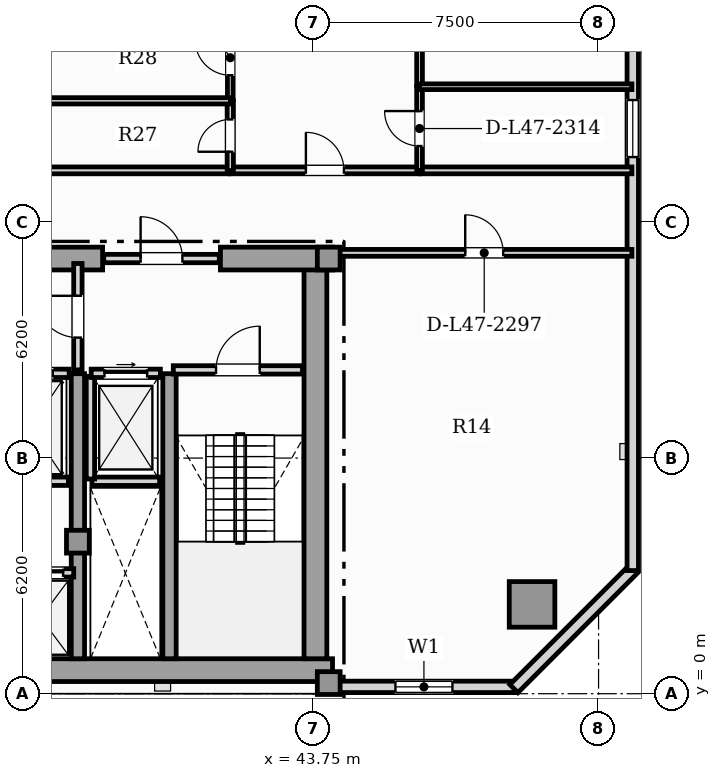
"""IFC4 building model, lengths in metres.
Left out: names, types, materials, properties, quantities, classifications, styles, units other than length and angle.
Written with IfcOpenShell. Run it as: python <this file> out.ifc"""

import sys

from ifc_helpers import new_model, si_unit, direction, frame, frame_2d, origin, origin_2d, place, context, subcontext, project, spatial, rectangle, hollow_rectangle, extrude, element, fill, save


model = new_model("IFC4")
c1 = context("Model", 3, precision=1e-05, world=origin(), true_north=direction((0.0, 1.0)))
c2 = subcontext(c1, "Body", "Model", "MODEL_VIEW")
j1 = project(units=[si_unit("LENGTHUNIT", "METRE"), si_unit("PLANEANGLEUNIT", "RADIAN")], contexts=[c1])
p1 = place(None, origin())
s1 = spatial("IfcSite", under=j1, at=p1, CompositionType="ELEMENT")
p2 = place(p1, origin())
s2 = spatial("IfcBuilding", under=s1, at=p2, CompositionType="ELEMENT")
p3 = place(p2, frame((0.0, 0.0, 192.6)))
s3 = spatial("IfcBuildingStorey", under=s2, at=p3, CompositionType="ELEMENT", Elevation=192.6)
p4 = place(p3, frame((13.25, 0.62, 0.0), z_axis=(0.0, 0.0, 1.0), x_axis=(1.0, 0.0, 0.0)))
e1 = element("IfcWall", 1, at=p4, inside=s3, PredefinedType="SHEAR", context=c2, shape_type="SweptSolid", body=[
    extrude(rectangle(XDim=31.0, YDim=0.6, at=frame_2d((15.5, 0.0))), origin(), (0.0, 0.0, 1.0), 3.63),
])
p5 = place(p3, frame((43.8, 0.92, 0.0), z_axis=(0.0, 0.0, 1.0), x_axis=(0.0, 1.0, 0.0)))
e2 = element("IfcWall", 2, at=p5, inside=s3, PredefinedType="SHEAR", context=c2, shape_type="SweptSolid", body=[
    extrude(rectangle(XDim=10.53, YDim=0.6, at=frame_2d((5.265, 0.0))), origin(), (0.0, 0.0, 1.0), 3.63),
])
p6 = place(p3, frame((30.9, 11.45, 0.0), z_axis=(0.0, 0.0, 1.0), x_axis=(1.0, 0.0, 0.0)))
e3 = element("IfcWall", 3, at=p6, inside=s3, PredefinedType="SHEAR", context=c2, shape_type="SweptSolid", body=[
    extrude(rectangle(XDim=7.3, YDim=0.6, at=frame_2d((3.65, 0.0))), origin(), (0.0, 0.0, 1.0), 3.63),
])
p7 = place(p3, frame((41.3, 11.45, 0.0), z_axis=(0.0, 0.0, 1.0), x_axis=(1.0, 0.0, 0.0)))
e4 = element("IfcWall", 4, at=p7, inside=s3, PredefinedType="SHEAR", context=c2, shape_type="SweptSolid", body=[
    extrude(rectangle(XDim=2.95, YDim=0.6, at=frame_2d((1.475, 0.0))), origin(), (0.0, 0.0, 1.0), 3.63),
])
for number, where, z_axis, x_axis in (
    (5, (37.55, 0.92, 0.0), (0.0, 0.0, 1.0), (0.0, 1.0, 0.0)),
    (6, (39.96, 0.92, 0.0), (0.0, 0.0, 1.0), (0.0, 1.0, 0.0)),
):
    element("IfcWall", number, at=place(p3, frame(where, z_axis=z_axis, x_axis=x_axis)), inside=s3, PredefinedType="SHEAR", context=c2, shape_type="SweptSolid", body=[
        extrude(rectangle(XDim=7.5, YDim=0.35, at=frame_2d((3.75, 0.0))), origin(), (0.0, 0.0, 1.0), 3.63),
    ])
for number, where, z_axis, x_axis in (
    (7, (44.15, 0.28, 0.0), (0.0, 0.0, 1.0), (1.0, 0.0, 0.0)),
    (8, (44.15, 11.45, 0.0), (0.0, 0.0, 1.0), (1.0, 0.0, 0.0)),
    (9, (37.55, 4.0, 0.0), (0.0, 0.0, 1.0), (1.0, 0.0, 0.0)),
):
    element("IfcColumn", number, at=place(p3, frame(where, z_axis=z_axis, x_axis=x_axis)), inside=s3, PredefinedType="COLUMN", context=c2, shape_type="SweptSolid", body=[
        extrude(rectangle(XDim=0.6, YDim=0.6, at=origin_2d()), origin(), (0.0, 0.0, 1.0), 3.85),
    ])
p8 = place(p3, frame((49.5, 2.35, 0.0), z_axis=(0.0, 0.0, 1.0), x_axis=(1.0, 0.0, 0.0)))
e10 = element("IfcColumn", 10, at=p8, inside=s3, PredefinedType="USERDEFINED", context=c2, shape_type="SweptSolid", body=[
    extrude(hollow_rectangle(XDim=1.2, YDim=1.2, WallThickness=0.07, at=origin_2d()), origin(), (0.0, 0.0, 1.0), 3.85),
])
p9 = place(p3, frame((44.25, 0.18, 0.0), z_axis=(0.0, 0.0, 1.0), x_axis=(1.0, 0.0, 0.0)))
e11 = element("IfcWall", 11, at=p9, inside=s3, PredefinedType="SOLIDWALL", context=c2, shape_type="SweptSolid", body=[
    extrude(rectangle(XDim=4.81, YDim=0.3, at=frame_2d((2.405, 0.0))), origin(), (0.0, 0.0, 1.0), 3.63),
])
p10 = place(p9, frame((1.655, 0.0, 0.9)))
e12 = element("IfcOpeningElement", 12, at=p10, cuts=e11, PredefinedType="OPENING", context=c2, shape_type="SweptSolid", body=[
    extrude(rectangle(XDim=1.5, YDim=1.95, at=frame_2d((0.75, 0.975))), frame((0.0, 0.16, 0.0), z_axis=(0.0, -1.0, 0.0), x_axis=(1.0, 0.0, 0.0)), (0.0, 0.0, 1.0), 0.32),
])
p11 = place(p3, frame((49.022, 0.135, 0.0), z_axis=(0.0, 0.0, 1.0), x_axis=(0.707106781187, 0.707106781187, 0.0)))
e13 = element("IfcWall", 13, at=p11, inside=s3, PredefinedType="SOLIDWALL", context=c2, shape_type="SweptSolid", body=[
    extrude(rectangle(XDim=4.445, YDim=0.3, at=frame_2d((2.223, 0.0))), origin(), (0.0, 0.0, 1.0), 3.63),
])
p12 = place(p3, frame((52.15, 3.24, 0.0), z_axis=(0.0, 0.0, 1.0), x_axis=(0.0, 1.0, 0.0)))
e14 = element("IfcWall", 14, at=p12, inside=s3, PredefinedType="SOLIDWALL", context=c2, shape_type="SweptSolid", body=[
    extrude(rectangle(XDim=33.92, YDim=0.3, at=frame_2d((16.96, 0.0))), origin(), (0.0, 0.0, 1.0), 3.63),
])
p13 = place(p12, frame((30.56, 0.0, 0.95)))
e15 = element("IfcOpeningElement", 15, at=p13, cuts=e14, PredefinedType="OPENING", context=c2, shape_type="SweptSolid", body=[
    extrude(rectangle(XDim=0.9, YDim=1.5, at=frame_2d((0.45, 0.75))), frame((0.0, 0.16, 0.0), z_axis=(0.0, -1.0, 0.0), x_axis=(1.0, 0.0, 0.0)), (0.0, 0.0, 1.0), 0.32),
])
p14 = place(p12, frame((10.88, 0.0, 0.9)))
e16 = element("IfcOpeningElement", 16, at=p14, cuts=e14, PredefinedType="OPENING", context=c2, shape_type="SweptSolid", body=[
    extrude(rectangle(XDim=1.5, YDim=1.95, at=frame_2d((0.75, 0.975))), frame((0.0, 0.16, 0.0), z_axis=(0.0, -1.0, 0.0), x_axis=(1.0, 0.0, 0.0)), (0.0, 0.0, 1.0), 0.32),
])
p15 = place(p12, frame((14.613, 0.0, 0.9)))
e17 = element("IfcOpeningElement", 17, at=p15, cuts=e14, PredefinedType="OPENING", context=c2, shape_type="SweptSolid", body=[
    extrude(rectangle(XDim=1.5, YDim=1.95, at=frame_2d((0.75, 0.975))), frame((0.0, 0.16, 0.0), z_axis=(0.0, -1.0, 0.0), x_axis=(1.0, 0.0, 0.0)), (0.0, 0.0, 1.0), 0.32),
])
p16 = place(p12, frame((19.876, 0.0, 0.9)))
e18 = element("IfcOpeningElement", 18, at=p16, cuts=e14, PredefinedType="OPENING", context=c2, shape_type="SweptSolid", body=[
    extrude(rectangle(XDim=1.5, YDim=1.95, at=frame_2d((0.75, 0.975))), frame((0.0, 0.16, 0.0), z_axis=(0.0, -1.0, 0.0), x_axis=(1.0, 0.0, 0.0)), (0.0, 0.0, 1.0), 0.32),
])
p17 = place(p12, frame((26.009, 0.0, 0.9)))
e19 = element("IfcOpeningElement", 19, at=p17, cuts=e14, PredefinedType="OPENING", context=c2, shape_type="SweptSolid", body=[
    extrude(rectangle(XDim=1.5, YDim=1.95, at=frame_2d((0.75, 0.975))), frame((0.0, 0.16, 0.0), z_axis=(0.0, -1.0, 0.0), x_axis=(1.0, 0.0, 0.0)), (0.0, 0.0, 1.0), 0.32),
])
p18 = place(p12, frame((32.24, 0.0, 0.95)))
e20 = element("IfcOpeningElement", 20, at=p18, cuts=e14, PredefinedType="OPENING", context=c2, shape_type="SweptSolid", body=[
    extrude(rectangle(XDim=0.9, YDim=1.5, at=frame_2d((0.45, 0.75))), frame((0.0, 0.16, 0.0), z_axis=(0.0, -1.0, 0.0), x_axis=(1.0, 0.0, 0.0)), (0.0, 0.0, 1.0), 0.32),
])
p19 = place(p3, frame((37.92, 5.59, 0.0), z_axis=(0.0, 0.0, 1.0), x_axis=(1.0, 0.0, 0.0)))
e21 = element("IfcWall", 21, at=p19, inside=s3, PredefinedType="SOLIDWALL", context=c2, shape_type="SweptSolid", body=[
    extrude(rectangle(XDim=1.78, YDim=0.22, at=frame_2d((0.89, 0.0))), origin(), (0.0, 0.0, 1.0), 3.63),
])
p20 = place(p3, frame((37.88, 5.65, 0.0), z_axis=(0.0, 0.0, 1.0), x_axis=(0.0, 1.0, 0.0)))
e22 = element("IfcWall", 22, at=p20, inside=s3, PredefinedType="SOLIDWALL", context=c2, shape_type="SweptSolid", body=[
    extrude(rectangle(XDim=2.7, YDim=0.22, at=frame_2d((1.35, 0.0))), origin(), (0.0, 0.0, 1.0), 3.63),
])
p21 = place(p3, frame((37.9, 8.43, 0.0), z_axis=(0.0, 0.0, 1.0), x_axis=(1.0, 0.0, 0.0)))
e23 = element("IfcWall", 23, at=p21, inside=s3, PredefinedType="SOLIDWALL", context=c2, shape_type="SweptSolid", body=[
    extrude(rectangle(XDim=1.82, YDim=0.22, at=frame_2d((0.91, 0.0))), origin(), (0.0, 0.0, 1.0), 3.63),
])
p22 = place(p21, frame((0.35, 0.0, 0.0)))
e24 = element("IfcOpeningElement", 24, at=p22, cuts=e23, PredefinedType="OPENING", context=c2, shape_type="SweptSolid", body=[
    extrude(rectangle(XDim=1.12, YDim=2.25, at=frame_2d((0.56, 1.125))), frame((0.0, 0.12, 0.0), z_axis=(0.0, -1.0, 0.0), x_axis=(1.0, 0.0, 0.0)), (0.0, 0.0, 1.0), 0.24),
])
p23 = place(p3, frame((35.3, 5.59, 0.0), z_axis=(0.0, 0.0, 1.0), x_axis=(1.0, 0.0, 0.0)))
e25 = element("IfcWall", 25, at=p23, inside=s3, PredefinedType="SOLIDWALL", context=c2, shape_type="SweptSolid", body=[
    extrude(rectangle(XDim=2.0, YDim=0.22, at=frame_2d((1.0, 0.0))), origin(), (0.0, 0.0, 1.0), 3.63),
])
p24 = place(p3, frame((35.28, 8.43, 0.0), z_axis=(0.0, 0.0, 1.0), x_axis=(1.0, 0.0, 0.0)))
e26 = element("IfcWall", 26, at=p24, inside=s3, PredefinedType="SOLIDWALL", context=c2, shape_type="SweptSolid", body=[
    extrude(rectangle(XDim=2.04, YDim=0.22, at=frame_2d((1.02, 0.0))), origin(), (0.0, 0.0, 1.0), 3.63),
])
p25 = place(p24, frame((0.43, 0.0, 0.0)))
e27 = element("IfcOpeningElement", 27, at=p25, cuts=e26, PredefinedType="OPENING", context=c2, shape_type="SweptSolid", body=[
    extrude(rectangle(XDim=1.18, YDim=2.2, at=frame_2d((0.59, 1.1))), frame((0.0, 0.12, 0.0), z_axis=(0.0, -1.0, 0.0), x_axis=(1.0, 0.0, 0.0)), (0.0, 0.0, 1.0), 0.24),
])
p26 = place(p3, frame((35.7, 3.18, 0.0), z_axis=(0.0, 0.0, 1.0), x_axis=(1.0, 0.0, 0.0)))
e28 = element("IfcWall", 28, at=p26, inside=s3, PredefinedType="SOLIDWALL", context=c2, shape_type="SweptSolid", body=[
    extrude(rectangle(XDim=1.74, YDim=0.22, at=frame_2d((0.87, 0.0))), origin(), (0.0, 0.0, 1.0), 3.63),
])
p27 = place(p26, frame((0.28, 0.0, 0.0)))
e29 = element("IfcOpeningElement", 29, at=p27, cuts=e28, PredefinedType="OPENING", context=c2, shape_type="SweptSolid", body=[
    extrude(rectangle(XDim=1.18, YDim=2.2, at=frame_2d((0.59, 1.1))), frame((0.0, 0.12, 0.0), z_axis=(0.0, -1.0, 0.0), x_axis=(1.0, 0.0, 0.0)), (0.0, 0.0, 1.0), 0.24),
])
p28 = place(p3, frame((40.06, 8.52, 0.0), z_axis=(0.0, 0.0, 1.0), x_axis=(1.0, 0.0, 0.0)))
e30 = element("IfcWall", 30, at=p28, inside=s3, PredefinedType="SOLIDWALL", context=c2, shape_type="SweptSolid", body=[
    extrude(rectangle(XDim=3.4, YDim=0.22, at=frame_2d((1.7, 0.0))), origin(), (0.0, 0.0, 1.0), 3.63),
])
p29 = place(p28, frame((1.125, 0.0, 0.0)))
e31 = element("IfcOpeningElement", 31, at=p29, cuts=e30, PredefinedType="OPENING", context=c2, shape_type="SweptSolid", body=[
    extrude(rectangle(XDim=1.15, YDim=2.2, at=frame_2d((0.575, 1.1))), frame((0.0, 0.12, 0.0), z_axis=(0.0, -1.0, 0.0), x_axis=(1.0, 0.0, 0.0)), (0.0, 0.0, 1.0), 0.24),
])
p30 = place(p3, frame((37.55, 8.52, 0.0), z_axis=(0.0, 0.0, 1.0), x_axis=(0.0, 1.0, 0.0)))
e32 = element("IfcWall", 32, at=p30, inside=s3, PredefinedType="SOLIDWALL", context=c2, shape_type="SweptSolid", body=[
    extrude(rectangle(XDim=2.8, YDim=0.22, at=frame_2d((1.4, 0.0))), origin(), (0.0, 0.0, 1.0), 3.085),
])
p31 = place(p30, frame((0.85, 0.0, 0.0)))
e33 = element("IfcOpeningElement", 33, at=p31, cuts=e32, PredefinedType="OPENING", context=c2, shape_type="SweptSolid", body=[
    extrude(rectangle(XDim=1.1, YDim=2.2, at=frame_2d((0.55, 1.1))), frame((0.0, 0.12, 0.0), z_axis=(0.0, -1.0, 0.0), x_axis=(1.0, 0.0, 0.0)), (0.0, 0.0, 1.0), 0.24),
])
p32 = place(p3, frame((38.23, 11.45, 0.0), z_axis=(0.0, 0.0, 1.0), x_axis=(1.0, 0.0, 0.0)))
e34 = element("IfcWall", 34, at=p32, inside=s3, PredefinedType="SOLIDWALL", context=c2, shape_type="SweptSolid", body=[
    extrude(rectangle(XDim=3.04, YDim=0.22, at=frame_2d((1.52, 0.0))), origin(), (0.0, 0.0, 1.0), 3.63),
])
p33 = place(p32, frame((0.97, 0.0, 0.0)))
e35 = element("IfcOpeningElement", 35, at=p33, cuts=e34, PredefinedType="OPENING", context=c2, shape_type="SweptSolid", body=[
    extrude(rectangle(XDim=1.1, YDim=2.2, at=frame_2d((0.55, 1.1))), frame((0.0, 0.12, 0.0), z_axis=(0.0, -1.0, 0.0), x_axis=(1.0, 0.0, 0.0)), (0.0, 0.0, 1.0), 0.24),
])
p34 = place(p3, frame((44.355, 11.6, 0.0), z_axis=(0.0, 0.0, 1.0), x_axis=(1.0, 0.0, 0.0)))
e36 = element("IfcWall", 36, at=p34, inside=s3, PredefinedType="PARTITIONING", context=c2, shape_type="SweptSolid", body=[
    extrude(rectangle(XDim=7.772, YDim=0.18, at=frame_2d((3.886, 0.0))), origin(), (0.0, 0.0, 1.0), 3.63),
])
p35 = place(p34, frame((3.386, 0.0, 0.0)))
e37 = element("IfcOpeningElement", 37, at=p35, cuts=e36, PredefinedType="OPENING", context=c2, shape_type="SweptSolid", body=[
    extrude(rectangle(XDim=1.0, YDim=2.15, at=frame_2d((0.5, 1.075))), frame((0.0, 0.1, 0.0), z_axis=(0.0, -1.0, 0.0), x_axis=(1.0, 0.0, 0.0)), (0.0, 0.0, 1.0), 0.2),
])
p36 = place(p3, frame((41.555, 13.77, 0.0), z_axis=(0.0, 0.0, 1.0), x_axis=(1.0, 0.0, 0.0)))
e38 = element("IfcWall", 38, at=p36, inside=s3, PredefinedType="PARTITIONING", context=c2, shape_type="SweptSolid", body=[
    extrude(rectangle(XDim=4.99, YDim=0.18, at=frame_2d((2.495, 0.0))), origin(), (0.0, 0.0, 1.0), 3.63),
])
p37 = place(p36, frame((1.995, 0.0, 0.0)))
e39 = element("IfcOpeningElement", 39, at=p37, cuts=e38, PredefinedType="OPENING", context=c2, shape_type="SweptSolid", body=[
    extrude(rectangle(XDim=1.0, YDim=2.15, at=frame_2d((0.5, 1.075))), frame((0.0, 0.1, 0.0), z_axis=(0.0, -1.0, 0.0), x_axis=(1.0, 0.0, 0.0)), (0.0, 0.0, 1.0), 0.2),
])
p38 = place(p3, frame((36.685, 13.77, 0.0), z_axis=(0.0, 0.0, 1.0), x_axis=(1.0, 0.0, 0.0)))
e40 = element("IfcWall", 40, at=p38, inside=s3, PredefinedType="PARTITIONING", context=c2, shape_type="SweptSolid", body=[
    extrude(rectangle(XDim=4.84, YDim=0.18, at=frame_2d((2.42, 0.0))), origin(), (0.0, 0.0, 1.0), 3.63),
])
p39 = place(p3, frame((46.575, 13.77, 0.0), z_axis=(0.0, 0.0, 1.0), x_axis=(1.0, 0.0, 0.0)))
e41 = element("IfcWall", 41, at=p39, inside=s3, PredefinedType="PARTITIONING", context=c2, shape_type="SweptSolid", body=[
    extrude(rectangle(XDim=5.553, YDim=0.18, at=frame_2d((2.776, 0.0))), origin(), (0.0, 0.0, 1.0), 3.63),
])
p40 = place(p3, frame((41.56, 13.765, 0.0), z_axis=(0.0, 0.0, 1.0), x_axis=(0.0, 1.0, 0.0)))
e42 = element("IfcWall", 42, at=p40, inside=s3, PredefinedType="PLUMBINGWALL", context=c2, shape_type="SweptSolid", body=[
    extrude(rectangle(XDim=1.84, YDim=0.165, at=frame_2d((0.92, 0.0))), origin(), (0.0, 0.0, 1.0), 3.63),
])
p41 = place(p40, frame((0.495, 0.0, 0.0)))
e43 = element("IfcOpeningElement", 43, at=p41, cuts=e42, PredefinedType="OPENING", context=c2, shape_type="SweptSolid", body=[
    extrude(rectangle(XDim=0.85, YDim=2.1, at=frame_2d((0.425, 1.05))), frame((0.0, 0.093, 0.0), z_axis=(0.0, -1.0, 0.0), x_axis=(1.0, 0.0, 0.0)), (0.0, 0.0, 1.0), 0.185),
])
p42 = place(p3, frame((41.56, 15.635, 0.0), z_axis=(0.0, 0.0, 1.0), x_axis=(0.0, 1.0, 0.0)))
e44 = element("IfcWall", 44, at=p42, inside=s3, PredefinedType="PARTITIONING", context=c2, shape_type="SweptSolid", body=[
    extrude(rectangle(XDim=2.197, YDim=0.15, at=frame_2d((1.099, 0.0))), origin(), (0.0, 0.0, 1.0), 3.63),
])
p43 = place(p42, frame((0.639, 0.0, 0.0)))
e45 = element("IfcOpeningElement", 45, at=p43, cuts=e44, PredefinedType="OPENING", context=c2, shape_type="SweptSolid", body=[
    extrude(rectangle(XDim=0.92, YDim=2.1, at=frame_2d((0.46, 1.05))), frame((0.0, 0.085, 0.0), z_axis=(0.0, -1.0, 0.0), x_axis=(1.0, 0.0, 0.0)), (0.0, 0.0, 1.0), 0.17),
])
p44 = place(p3, frame((46.54, 13.765, 0.0), z_axis=(0.0, 0.0, 1.0), x_axis=(0.0, 1.0, 0.0)))
e46 = element("IfcWall", 46, at=p44, inside=s3, PredefinedType="PARTITIONING", context=c2, shape_type="SweptSolid", body=[
    extrude(rectangle(XDim=2.211, YDim=0.15, at=frame_2d((1.105, 0.0))), origin(), (0.0, 0.0, 1.0), 3.63),
])
p45 = place(p44, frame((0.646, 0.0, 0.0)))
e47 = element("IfcOpeningElement", 47, at=p45, cuts=e46, PredefinedType="OPENING", context=c2, shape_type="SweptSolid", body=[
    extrude(rectangle(XDim=0.92, YDim=2.1, at=frame_2d((0.46, 1.05))), frame((0.0, 0.085, 0.0), z_axis=(0.0, -1.0, 0.0), x_axis=(1.0, 0.0, 0.0)), (0.0, 0.0, 1.0), 0.17),
])
p46 = place(p3, frame((46.54, 16.006, 0.0), z_axis=(0.0, 0.0, 1.0), x_axis=(0.0, 1.0, 0.0)))
e48 = element("IfcWall", 48, at=p46, inside=s3, PredefinedType="PARTITIONING", context=c2, shape_type="SweptSolid", body=[
    extrude(rectangle(XDim=5.234, YDim=0.15, at=frame_2d((2.617, 0.0))), origin(), (0.0, 0.0, 1.0), 3.63),
])
p47 = place(p46, frame((2.157, 0.0, 0.0)))
e49 = element("IfcOpeningElement", 49, at=p47, cuts=e48, PredefinedType="OPENING", context=c2, shape_type="SweptSolid", body=[
    extrude(rectangle(XDim=0.92, YDim=2.1, at=frame_2d((0.46, 1.05))), frame((0.0, 0.085, 0.0), z_axis=(0.0, -1.0, 0.0), x_axis=(1.0, 0.0, 0.0)), (0.0, 0.0, 1.0), 0.17),
])
p48 = place(p3, frame((36.685, 15.6, 0.0), z_axis=(0.0, 0.0, 1.0), x_axis=(1.0, 0.0, 0.0)))
e50 = element("IfcWall", 50, at=p48, inside=s3, PredefinedType="PLUMBINGWALL", context=c2, shape_type="SweptSolid", body=[
    extrude(rectangle(XDim=4.88, YDim=0.165, at=frame_2d((2.44, 0.0))), origin(), (0.0, 0.0, 1.0), 3.63),
])
p49 = place(p3, frame((46.535, 15.971, 0.0), z_axis=(0.0, 0.0, 1.0), x_axis=(1.0, 0.0, 0.0)))
e51 = element("IfcWall", 51, at=p49, inside=s3, PredefinedType="PARTITIONING", context=c2, shape_type="SweptSolid", body=[
    extrude(rectangle(XDim=5.593, YDim=0.15, at=frame_2d((2.796, 0.0))), origin(), (0.0, 0.0, 1.0), 3.63),
])
p50 = place(p10, origin())
e52 = element("IfcWindow", 52, at=p50, inside=s3, PartitioningType="SINGLE_PANEL", PredefinedType="WINDOW", context=c2, shape_type="SweptSolid", body=[
    extrude(rectangle(XDim=1.5, YDim=1.95, at=frame_2d((0.75, 0.975))), frame((0.0, 0.03, 0.0), z_axis=(0.0, -1.0, 0.0), x_axis=(1.0, 0.0, 0.0)), (0.0, 0.0, 1.0), 0.06),
])
fill(e12, e52)
p51 = place(p14, origin())
e53 = element("IfcWindow", 53, at=p51, inside=s3, PartitioningType="SINGLE_PANEL", PredefinedType="WINDOW", context=c2, shape_type="SweptSolid", body=[
    extrude(rectangle(XDim=1.5, YDim=1.95, at=frame_2d((0.75, 0.975))), frame((0.0, 0.03, 0.0), z_axis=(0.0, -1.0, 0.0), x_axis=(1.0, 0.0, 0.0)), (0.0, 0.0, 1.0), 0.06),
])
fill(e16, e53)
p52 = place(p22, origin())
e54 = element("IfcDoor", 54, at=p52, inside=s3, OperationType="SLIDING_TO_RIGHT", PredefinedType="DOOR", context=c2, shape_type="SweptSolid", body=[
    extrude(rectangle(XDim=1.12, YDim=2.25, at=frame_2d((0.56, 1.125))), frame((0.0, 0.025, 0.0), z_axis=(0.0, -1.0, 0.0), x_axis=(1.0, 0.0, 0.0)), (0.0, 0.0, 1.0), 0.05),
])
fill(e24, e54)
p53 = place(p25, origin())
e55 = element("IfcDoor", 55, at=p53, inside=s3, OperationType="SLIDING_TO_LEFT", PredefinedType="DOOR", context=c2, shape_type="SweptSolid", body=[
    extrude(rectangle(XDim=1.18, YDim=2.2, at=frame_2d((0.59, 1.1))), frame((0.0, 0.025, 0.0), z_axis=(0.0, -1.0, 0.0), x_axis=(1.0, 0.0, 0.0)), (0.0, 0.0, 1.0), 0.05),
])
fill(e27, e55)
p54 = place(p27, origin())
e56 = element("IfcDoor", 56, at=p54, inside=s3, OperationType="SLIDING_TO_RIGHT", PredefinedType="DOOR", context=c2, shape_type="SweptSolid", body=[
    extrude(rectangle(XDim=1.18, YDim=2.2, at=frame_2d((0.59, 1.1))), frame((0.0, 0.025, 0.0), z_axis=(0.0, -1.0, 0.0), x_axis=(1.0, 0.0, 0.0)), (0.0, 0.0, 1.0), 0.05),
])
fill(e29, e56)
p55 = place(p29, origin())
e57 = element("IfcDoor", 57, at=p55, inside=s3, OperationType="SINGLE_SWING_RIGHT", PredefinedType="DOOR", context=c2, shape_type="SweptSolid", body=[
    extrude(rectangle(XDim=1.15, YDim=2.2, at=frame_2d((0.575, 1.1))), frame((0.0, 0.025, 0.0), z_axis=(0.0, -1.0, 0.0), x_axis=(1.0, 0.0, 0.0)), (0.0, 0.0, 1.0), 0.05),
])
fill(e31, e57)
p56 = place(p31, origin())
e58 = element("IfcDoor", 58, at=p56, inside=s3, OperationType="SINGLE_SWING_RIGHT", PredefinedType="DOOR", context=c2, shape_type="SweptSolid", body=[
    extrude(rectangle(XDim=1.1, YDim=2.2, at=frame_2d((0.55, 1.1))), frame((0.0, 0.025, 0.0), z_axis=(0.0, -1.0, 0.0), x_axis=(1.0, 0.0, 0.0)), (0.0, 0.0, 1.0), 0.05),
])
fill(e33, e58)
p57 = place(p33, origin())
e59 = element("IfcDoor", 59, at=p57, inside=s3, OperationType="SINGLE_SWING_LEFT", PredefinedType="DOOR", context=c2, shape_type="SweptSolid", body=[
    extrude(rectangle(XDim=1.1, YDim=2.2, at=frame_2d((0.55, 1.1))), frame((0.0, 0.025, 0.0), z_axis=(0.0, -1.0, 0.0), x_axis=(1.0, 0.0, 0.0)), (0.0, 0.0, 1.0), 0.05),
])
fill(e35, e59)
p58 = place(p35, origin())
e60 = element("IfcDoor", 60, at=p58, inside=s3, OperationType="SINGLE_SWING_LEFT", PredefinedType="DOOR", context=c2, shape_type="SweptSolid", body=[
    extrude(rectangle(XDim=1.0, YDim=2.15, at=frame_2d((0.5, 1.075))), frame((0.0, 0.025, 0.0), z_axis=(0.0, -1.0, 0.0), x_axis=(1.0, 0.0, 0.0)), (0.0, 0.0, 1.0), 0.05),
])
fill(e37, e60)
p59 = place(p37, origin())
e61 = element("IfcDoor", 61, at=p59, inside=s3, OperationType="SINGLE_SWING_LEFT", PredefinedType="DOOR", context=c2, shape_type="SweptSolid", body=[
    extrude(rectangle(XDim=1.0, YDim=2.15, at=frame_2d((0.5, 1.075))), frame((0.0, 0.025, 0.0), z_axis=(0.0, -1.0, 0.0), x_axis=(1.0, 0.0, 0.0)), (0.0, 0.0, 1.0), 0.05),
])
fill(e39, e61)
p60 = place(p41, origin())
e62 = element("IfcDoor", 62, at=p60, inside=s3, OperationType="SINGLE_SWING_LEFT", PredefinedType="DOOR", context=c2, shape_type="SweptSolid", body=[
    extrude(rectangle(XDim=0.85, YDim=2.1, at=frame_2d((0.425, 1.05))), frame((0.0, 0.025, 0.0), z_axis=(0.0, -1.0, 0.0), x_axis=(1.0, 0.0, 0.0)), (0.0, 0.0, 1.0), 0.05),
])
fill(e43, e62)
p61 = place(p43, origin())
e63 = element("IfcDoor", 63, at=p61, inside=s3, OperationType="SINGLE_SWING_RIGHT", PredefinedType="DOOR", context=c2, shape_type="SweptSolid", body=[
    extrude(rectangle(XDim=0.92, YDim=2.1, at=frame_2d((0.46, 1.05))), frame((0.0, 0.025, 0.0), z_axis=(0.0, -1.0, 0.0), x_axis=(1.0, 0.0, 0.0)), (0.0, 0.0, 1.0), 0.05),
])
fill(e45, e63)
p62 = place(p45, origin())
e64 = element("IfcDoor", 64, at=p62, inside=s3, OperationType="SINGLE_SWING_RIGHT", PredefinedType="DOOR", context=c2, shape_type="SweptSolid", body=[
    extrude(rectangle(XDim=0.92, YDim=2.1, at=frame_2d((0.46, 1.05))), frame((0.0, 0.025, 0.0), z_axis=(0.0, -1.0, 0.0), x_axis=(1.0, 0.0, 0.0)), (0.0, 0.0, 1.0), 0.05),
])
fill(e47, e64)
save(model, sys.argv[1])
